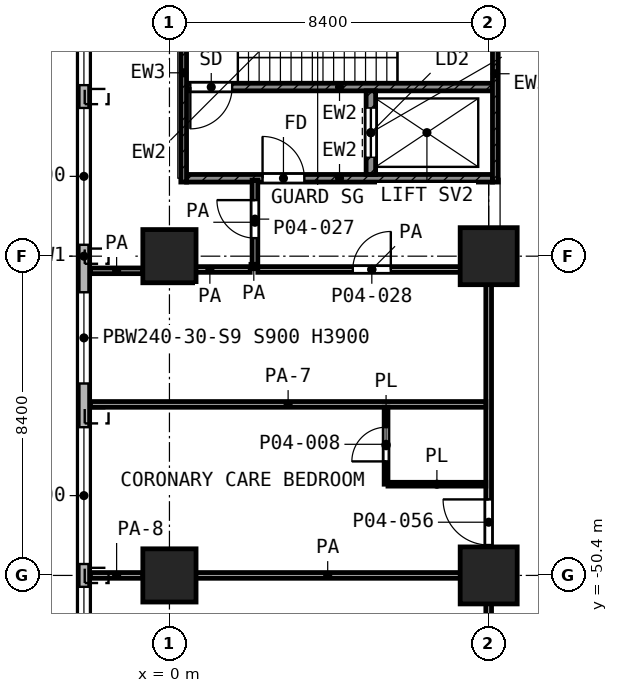
"""IFC4 building model, lengths in metres.
Left out: names, types, materials, properties, quantities, classifications, styles, units other than length and angle.
Written with IfcOpenShell. Run it as: python <this file> out.ifc"""

import sys

from ifc_helpers import new_model, si_unit, direction, frame, frame_2d, origin, origin_2d, place, context, subcontext, project, spatial, rectangle, extrude, element, fill, save


model = new_model("IFC4")
c1 = context("Model", 3, precision=1e-05, world=origin(), true_north=direction((0.0, 1.0)))
c2 = subcontext(c1, "Body", "Model", "MODEL_VIEW")
j1 = project(units=[si_unit("LENGTHUNIT", "METRE"), si_unit("PLANEANGLEUNIT", "RADIAN")], contexts=[c1])
p1 = place(None, origin())
s1 = spatial("IfcSite", under=j1, at=p1, CompositionType="ELEMENT")
p2 = place(p1, origin())
s2 = spatial("IfcBuilding", under=s1, at=p2, CompositionType="ELEMENT")
p3 = place(p2, frame((0.0, 0.0, 18.2)))
s3 = spatial("IfcBuildingStorey", under=s2, at=p3, CompositionType="ELEMENT", Elevation=18.2)
p4 = place(p3, frame((0.0, -42.0, 0.0), z_axis=(0.0, 0.0, 1.0), x_axis=(1.0, 0.0, 0.0)))
e1 = element("IfcColumn", 1, at=p4, inside=s3, PredefinedType="COLUMN", context=c2, shape_type="SweptSolid", body=[
    extrude(rectangle(XDim=1.4, YDim=1.4, at=origin_2d()), origin(), (0.0, 0.0, 1.0), 5.6),
])
p5 = place(p3, frame((8.4, -42.0, 0.0), z_axis=(0.0, 0.0, 1.0), x_axis=(1.0, 0.0, 0.0)))
e2 = element("IfcColumn", 2, at=p5, inside=s3, PredefinedType="COLUMN", context=c2, shape_type="SweptSolid", body=[
    extrude(rectangle(XDim=1.5, YDim=1.5, at=origin_2d()), origin(), (0.0, 0.0, 1.0), 5.6),
])
p6 = place(p3, frame((0.0, -50.4, 0.0), z_axis=(0.0, 0.0, 1.0), x_axis=(1.0, 0.0, 0.0)))
e3 = element("IfcColumn", 3, at=p6, inside=s3, PredefinedType="COLUMN", context=c2, shape_type="SweptSolid", body=[
    extrude(rectangle(XDim=1.4, YDim=1.4, at=origin_2d()), origin(), (0.0, 0.0, 1.0), 5.6),
])
p7 = place(p3, frame((8.4, -50.4, 0.0), z_axis=(0.0, 0.0, 1.0), x_axis=(1.0, 0.0, 0.0)))
e4 = element("IfcColumn", 4, at=p7, inside=s3, PredefinedType="COLUMN", context=c2, shape_type="SweptSolid", body=[
    extrude(rectangle(XDim=1.5, YDim=1.5, at=origin_2d()), origin(), (0.0, 0.0, 1.0), 5.6),
])
p8 = place(p3, frame((-2.25, -3.662, 0.0), z_axis=(0.0, 0.0, 1.0), x_axis=(0.0, -1.0, 0.0)))
e5 = element("IfcWall", 5, at=p8, inside=s3, PredefinedType="SOLIDWALL", context=c2, shape_type="SweptSolid", body=[
    extrude(rectangle(XDim=76.676, YDim=0.3, at=frame_2d((38.338, 0.0))), origin(), (0.0, 0.0, 1.0), 5.05),
])
p9 = place(p8, frame((0.838, 0.0, 0.9)))
e6 = element("IfcOpeningElement", 6, at=p9, cuts=e5, PredefinedType="OPENING", context=c2, shape_type="SweptSolid", body=[
    extrude(rectangle(XDim=3.6, YDim=3.0, at=frame_2d((1.8, 1.5))), frame((0.0, 0.16, 0.0), z_axis=(0.0, -1.0, 0.0), x_axis=(1.0, 0.0, 0.0)), (0.0, 0.0, 1.0), 0.32),
])
p10 = place(p8, frame((5.038, 0.0, 0.9)))
e7 = element("IfcOpeningElement", 7, at=p10, cuts=e5, PredefinedType="OPENING", context=c2, shape_type="SweptSolid", body=[
    extrude(rectangle(XDim=3.6, YDim=3.0, at=frame_2d((1.8, 1.5))), frame((0.0, 0.16, 0.0), z_axis=(0.0, -1.0, 0.0), x_axis=(1.0, 0.0, 0.0)), (0.0, 0.0, 1.0), 0.32),
])
p11 = place(p8, frame((9.238, 0.0, 0.9)))
e8 = element("IfcOpeningElement", 8, at=p11, cuts=e5, PredefinedType="OPENING", context=c2, shape_type="SweptSolid", body=[
    extrude(rectangle(XDim=3.6, YDim=3.0, at=frame_2d((1.8, 1.5))), frame((0.0, 0.16, 0.0), z_axis=(0.0, -1.0, 0.0), x_axis=(1.0, 0.0, 0.0)), (0.0, 0.0, 1.0), 0.32),
])
p12 = place(p8, frame((13.438, 0.0, 0.9)))
e9 = element("IfcOpeningElement", 9, at=p12, cuts=e5, PredefinedType="OPENING", context=c2, shape_type="SweptSolid", body=[
    extrude(rectangle(XDim=3.6, YDim=3.0, at=frame_2d((1.8, 1.5))), frame((0.0, 0.16, 0.0), z_axis=(0.0, -1.0, 0.0), x_axis=(1.0, 0.0, 0.0)), (0.0, 0.0, 1.0), 0.32),
])
p13 = place(p8, frame((17.638, 0.0, 0.9)))
e10 = element("IfcOpeningElement", 10, at=p13, cuts=e5, PredefinedType="OPENING", context=c2, shape_type="SweptSolid", body=[
    extrude(rectangle(XDim=3.6, YDim=3.0, at=frame_2d((1.8, 1.5))), frame((0.0, 0.16, 0.0), z_axis=(0.0, -1.0, 0.0), x_axis=(1.0, 0.0, 0.0)), (0.0, 0.0, 1.0), 0.32),
])
p14 = place(p8, frame((21.838, 0.0, 0.9)))
e11 = element("IfcOpeningElement", 11, at=p14, cuts=e5, PredefinedType="OPENING", context=c2, shape_type="SweptSolid", body=[
    extrude(rectangle(XDim=3.6, YDim=3.0, at=frame_2d((1.8, 1.5))), frame((0.0, 0.16, 0.0), z_axis=(0.0, -1.0, 0.0), x_axis=(1.0, 0.0, 0.0)), (0.0, 0.0, 1.0), 0.32),
])
p15 = place(p8, frame((26.038, 0.0, 0.9)))
e12 = element("IfcOpeningElement", 12, at=p15, cuts=e5, PredefinedType="OPENING", context=c2, shape_type="SweptSolid", body=[
    extrude(rectangle(XDim=3.6, YDim=3.0, at=frame_2d((1.8, 1.5))), frame((0.0, 0.16, 0.0), z_axis=(0.0, -1.0, 0.0), x_axis=(1.0, 0.0, 0.0)), (0.0, 0.0, 1.0), 0.32),
])
p16 = place(p8, frame((30.238, 0.0, 0.9)))
e13 = element("IfcOpeningElement", 13, at=p16, cuts=e5, PredefinedType="OPENING", context=c2, shape_type="SweptSolid", body=[
    extrude(rectangle(XDim=3.6, YDim=3.0, at=frame_2d((1.8, 1.5))), frame((0.0, 0.16, 0.0), z_axis=(0.0, -1.0, 0.0), x_axis=(1.0, 0.0, 0.0)), (0.0, 0.0, 1.0), 0.32),
])
p17 = place(p8, frame((34.438, 0.0, 0.9)))
e14 = element("IfcOpeningElement", 14, at=p17, cuts=e5, PredefinedType="OPENING", context=c2, shape_type="SweptSolid", body=[
    extrude(rectangle(XDim=3.6, YDim=3.0, at=frame_2d((1.8, 1.5))), frame((0.0, 0.16, 0.0), z_axis=(0.0, -1.0, 0.0), x_axis=(1.0, 0.0, 0.0)), (0.0, 0.0, 1.0), 0.32),
])
p18 = place(p8, frame((39.288, 0.0, 0.9)))
e15 = element("IfcOpeningElement", 15, at=p18, cuts=e5, PredefinedType="OPENING", context=c2, shape_type="SweptSolid", body=[
    extrude(rectangle(XDim=2.4, YDim=3.0, at=frame_2d((1.2, 1.5))), frame((0.0, 0.16, 0.0), z_axis=(0.0, -1.0, 0.0), x_axis=(1.0, 0.0, 0.0)), (0.0, 0.0, 1.0), 0.32),
])
p19 = place(p8, frame((42.838, 0.0, 0.9)))
e16 = element("IfcOpeningElement", 16, at=p19, cuts=e5, PredefinedType="OPENING", context=c2, shape_type="SweptSolid", body=[
    extrude(rectangle(XDim=3.6, YDim=3.0, at=frame_2d((1.8, 1.5))), frame((0.0, 0.16, 0.0), z_axis=(0.0, -1.0, 0.0), x_axis=(1.0, 0.0, 0.0)), (0.0, 0.0, 1.0), 0.32),
])
p20 = place(p8, frame((47.038, 0.0, 0.9)))
e17 = element("IfcOpeningElement", 17, at=p20, cuts=e5, PredefinedType="OPENING", context=c2, shape_type="SweptSolid", body=[
    extrude(rectangle(XDim=3.6, YDim=3.0, at=frame_2d((1.8, 1.5))), frame((0.0, 0.16, 0.0), z_axis=(0.0, -1.0, 0.0), x_axis=(1.0, 0.0, 0.0)), (0.0, 0.0, 1.0), 0.32),
])
p21 = place(p8, frame((51.238, 0.0, 0.9)))
e18 = element("IfcOpeningElement", 18, at=p21, cuts=e5, PredefinedType="OPENING", context=c2, shape_type="SweptSolid", body=[
    extrude(rectangle(XDim=3.6, YDim=3.0, at=frame_2d((1.8, 1.5))), frame((0.0, 0.16, 0.0), z_axis=(0.0, -1.0, 0.0), x_axis=(1.0, 0.0, 0.0)), (0.0, 0.0, 1.0), 0.32),
])
p22 = place(p8, frame((55.803, 0.0, 0.9)))
e19 = element("IfcOpeningElement", 19, at=p22, cuts=e5, PredefinedType="OPENING", context=c2, shape_type="SweptSolid", body=[
    extrude(rectangle(XDim=2.4, YDim=3.0, at=frame_2d((1.2, 1.5))), frame((0.0, 0.16, 0.0), z_axis=(0.0, -1.0, 0.0), x_axis=(1.0, 0.0, 0.0)), (0.0, 0.0, 1.0), 0.32),
])
p23 = place(p8, frame((59.638, 0.0, 0.9)))
e20 = element("IfcOpeningElement", 20, at=p23, cuts=e5, PredefinedType="OPENING", context=c2, shape_type="SweptSolid", body=[
    extrude(rectangle(XDim=3.6, YDim=3.0, at=frame_2d((1.8, 1.5))), frame((0.0, 0.16, 0.0), z_axis=(0.0, -1.0, 0.0), x_axis=(1.0, 0.0, 0.0)), (0.0, 0.0, 1.0), 0.32),
])
p24 = place(p8, frame((63.838, 0.0, 0.9)))
e21 = element("IfcOpeningElement", 21, at=p24, cuts=e5, PredefinedType="OPENING", context=c2, shape_type="SweptSolid", body=[
    extrude(rectangle(XDim=3.6, YDim=3.0, at=frame_2d((1.8, 1.5))), frame((0.0, 0.16, 0.0), z_axis=(0.0, -1.0, 0.0), x_axis=(1.0, 0.0, 0.0)), (0.0, 0.0, 1.0), 0.32),
])
p25 = place(p8, frame((68.438, 0.0, 0.9)))
e22 = element("IfcOpeningElement", 22, at=p25, cuts=e5, PredefinedType="OPENING", context=c2, shape_type="SweptSolid", body=[
    extrude(rectangle(XDim=1.2, YDim=3.0, at=frame_2d((0.6, 1.5))), frame((0.0, 0.16, 0.0), z_axis=(0.0, -1.0, 0.0), x_axis=(1.0, 0.0, 0.0)), (0.0, 0.0, 1.0), 0.32),
])
p26 = place(p8, frame((72.238, 0.0, 0.9)))
e23 = element("IfcOpeningElement", 23, at=p26, cuts=e5, PredefinedType="OPENING", context=c2, shape_type="SweptSolid", body=[
    extrude(rectangle(XDim=3.6, YDim=3.0, at=frame_2d((1.8, 1.5))), frame((0.0, 0.16, 0.0), z_axis=(0.0, -1.0, 0.0), x_axis=(1.0, 0.0, 0.0)), (0.0, 0.0, 1.0), 0.32),
])
p27 = place(p3, frame((0.375, -40.05, 0.0), z_axis=(0.0, 0.0, 1.0), x_axis=(0.0, 1.0, 0.0)))
e24 = element("IfcWall", 24, at=p27, inside=s3, PredefinedType="SHEAR", context=c2, shape_type="SweptSolid", body=[
    extrude(rectangle(XDim=5.75, YDim=0.15, at=frame_2d((2.875, 0.0))), origin(), (0.0, 0.0, 1.0), 5.05),
])
p28 = place(p3, frame((8.575, -40.05, 0.0), z_axis=(0.0, 0.0, 1.0), x_axis=(0.0, 1.0, 0.0)))
e25 = element("IfcWall", 25, at=p28, inside=s3, PredefinedType="SHEAR", context=c2, shape_type="SweptSolid", body=[
    extrude(rectangle(XDim=5.7, YDim=0.15, at=frame_2d((2.85, 0.0))), origin(), (0.0, 0.0, 1.0), 5.05),
])
p29 = place(p3, frame((0.45, -37.55, 0.0), z_axis=(0.0, 0.0, 1.0), x_axis=(1.0, 0.0, 0.0)))
e26 = element("IfcWall", 26, at=p29, inside=s3, PredefinedType="SHEAR", context=c2, shape_type="SweptSolid", body=[
    extrude(rectangle(XDim=8.05, YDim=0.2, at=frame_2d((4.025, 0.0))), origin(), (0.0, 0.0, 1.0), 5.05),
])
p30 = place(p29, frame((0.1, 0.0, 0.0)))
e27 = element("IfcOpeningElement", 27, at=p30, cuts=e26, PredefinedType="OPENING", context=c2, shape_type="SweptSolid", body=[
    extrude(rectangle(XDim=1.1, YDim=2.1, at=frame_2d((0.55, 1.05))), frame((0.0, 0.11, 0.0), z_axis=(0.0, -1.0, 0.0), x_axis=(1.0, 0.0, 0.0)), (0.0, 0.0, 1.0), 0.22),
])
p31 = place(p3, frame((0.45, -39.95, 0.0), z_axis=(0.0, 0.0, 1.0), x_axis=(1.0, 0.0, 0.0)))
e28 = element("IfcWall", 28, at=p31, inside=s3, PredefinedType="SHEAR", context=c2, shape_type="SweptSolid", body=[
    extrude(rectangle(XDim=8.05, YDim=0.2, at=frame_2d((4.025, 0.0))), origin(), (0.0, 0.0, 1.0), 5.05),
])
p32 = place(p31, frame((2.0, 0.0, 0.0)))
e29 = element("IfcOpeningElement", 29, at=p32, cuts=e28, PredefinedType="OPENING", context=c2, shape_type="SweptSolid", body=[
    extrude(rectangle(XDim=1.1, YDim=2.1, at=frame_2d((0.55, 1.05))), frame((0.0, 0.11, 0.0), z_axis=(0.0, -1.0, 0.0), x_axis=(1.0, 0.0, 0.0)), (0.0, 0.0, 1.0), 0.22),
])
p33 = place(p3, frame((5.3, -39.85, 0.0), z_axis=(0.0, 0.0, 1.0), x_axis=(0.0, 1.0, 0.0)))
e30 = element("IfcWall", 30, at=p33, inside=s3, PredefinedType="SHEAR", context=c2, shape_type="SweptSolid", body=[
    extrude(rectangle(XDim=2.2, YDim=0.25, at=frame_2d((1.1, 0.0))), origin(), (0.0, 0.0, 1.0), 5.05),
])
p34 = place(p33, frame((0.45, 0.0, 0.0)))
e31 = element("IfcOpeningElement", 31, at=p34, cuts=e30, PredefinedType="OPENING", context=c2, shape_type="SweptSolid", body=[
    extrude(rectangle(XDim=1.3, YDim=2.1, at=frame_2d((0.65, 1.05))), frame((0.0, 0.135, 0.0), z_axis=(0.0, -1.0, 0.0), x_axis=(1.0, 0.0, 0.0)), (0.0, 0.0, 1.0), 0.27),
])
p35 = place(p3, frame((5.75, -48.0, 0.0), z_axis=(0.0, 0.0, 1.0), x_axis=(1.0, 0.0, 0.0)))
e32 = element("IfcWall", 32, at=p35, inside=s3, PredefinedType="PARTITIONING", context=c2, shape_type="SweptSolid", body=[
    extrude(rectangle(XDim=2.575, YDim=0.1, at=frame_2d((1.288, 0.0))), origin(), (0.0, 0.0, 1.0), 5.05),
])
p36 = place(p3, frame((5.7, -48.0, 0.0), z_axis=(0.0, 0.0, 1.0), x_axis=(0.0, 1.0, 0.0)))
e33 = element("IfcWall", 33, at=p36, inside=s3, PredefinedType="PARTITIONING", context=c2, shape_type="SweptSolid", body=[
    extrude(rectangle(XDim=2.025, YDim=0.1, at=frame_2d((1.012, 0.0))), origin(), (0.0, 0.0, 1.0), 5.05),
])
p37 = place(p36, frame((0.6, 0.0, 0.0)))
e34 = element("IfcOpeningElement", 34, at=p37, cuts=e33, PredefinedType="OPENING", context=c2, shape_type="SweptSolid", body=[
    extrude(rectangle(XDim=0.9, YDim=2.1, at=frame_2d((0.45, 1.05))), frame((0.0, 0.06, 0.0), z_axis=(0.0, -1.0, 0.0), x_axis=(1.0, 0.0, 0.0)), (0.0, 0.0, 1.0), 0.12),
])
p38 = place(p3, frame((-2.08, -50.4, 0.0), z_axis=(0.0, 0.0, 1.0), x_axis=(1.0, 0.0, 0.0)))
e35 = element("IfcWall", 35, at=p38, inside=s3, PredefinedType="PARTITIONING", context=c2, shape_type="SweptSolid", body=[
    extrude(rectangle(XDim=1.38, YDim=0.15, at=frame_2d((0.69, 0.0))), origin(), (0.0, 0.0, 1.0), 4.15),
])
p39 = place(p3, frame((0.003, -50.4, 0.0), z_axis=(0.0, 0.0, 1.0), x_axis=(1.0, 0.0, 0.0)))
e36 = element("IfcWall", 36, at=p39, inside=s3, PredefinedType="PARTITIONING", context=c2, shape_type="SweptSolid", body=[
    extrude(rectangle(XDim=8.322, YDim=0.15, at=frame_2d((4.161, 0.0))), origin(), (0.0, 0.0, 1.0), 5.05),
])
p40 = place(p3, frame((-2.08, -45.9, 0.0), z_axis=(0.0, 0.0, 1.0), x_axis=(1.0, 0.0, 0.0)))
e37 = element("IfcWall", 37, at=p40, inside=s3, PredefinedType="PARTITIONING", context=c2, shape_type="SweptSolid", body=[
    extrude(rectangle(XDim=10.405, YDim=0.15, at=frame_2d((5.203, 0.0))), origin(), (0.0, 0.0, 1.0), 3.65),
])
p41 = place(p3, frame((-2.08, -42.385, 0.0), z_axis=(0.0, 0.0, 1.0), x_axis=(1.0, 0.0, 0.0)))
e38 = element("IfcWall", 38, at=p41, inside=s3, PredefinedType="PARTITIONING", context=c2, shape_type="SweptSolid", body=[
    extrude(rectangle(XDim=1.38, YDim=0.15, at=frame_2d((0.69, 0.0))), origin(), (0.0, 0.0, 1.0), 5.05),
])
p42 = place(p3, frame((0.003, -42.35, 0.0), z_axis=(0.0, 0.0, 1.0), x_axis=(1.0, 0.0, 0.0)))
e39 = element("IfcWall", 39, at=p42, inside=s3, PredefinedType="PARTITIONING", context=c2, shape_type="SweptSolid", body=[
    extrude(rectangle(XDim=2.122, YDim=0.15, at=frame_2d((1.061, 0.0))), origin(), (0.0, 0.0, 1.0), 5.05),
])
p43 = place(p3, frame((2.325, -42.35, 0.0), z_axis=(0.0, 0.0, 1.0), x_axis=(1.0, 0.0, 0.0)))
e40 = element("IfcWall", 40, at=p43, inside=s3, PredefinedType="PARTITIONING", context=c2, shape_type="SweptSolid", body=[
    extrude(rectangle(XDim=6.0, YDim=0.15, at=frame_2d((3.0, 0.0))), origin(), (0.0, 0.0, 1.0), 5.05),
])
p44 = place(p43, frame((2.5, 0.0, 0.0)))
e41 = element("IfcOpeningElement", 41, at=p44, cuts=e40, PredefinedType="OPENING", context=c2, shape_type="SweptSolid", body=[
    extrude(rectangle(XDim=1.0, YDim=2.1, at=frame_2d((0.5, 1.05))), frame((0.0, 0.085, 0.0), z_axis=(0.0, -1.0, 0.0), x_axis=(1.0, 0.0, 0.0)), (0.0, 0.0, 1.0), 0.17),
])
p45 = place(p3, frame((2.22, -42.33, 0.0), z_axis=(0.0, 0.0, 1.0), x_axis=(0.0, 1.0, 0.0)))
e42 = element("IfcWall", 42, at=p45, inside=s3, PredefinedType="PARTITIONING", context=c2, shape_type="SweptSolid", body=[
    extrude(rectangle(XDim=0.115, YDim=0.15, at=frame_2d((0.058, 0.0))), origin(), (0.0, 0.0, 1.0), 5.05),
])
p46 = place(p3, frame((2.25, -42.215, 0.0), z_axis=(0.0, 0.0, 1.0), x_axis=(0.0, 1.0, 0.0)))
e43 = element("IfcWall", 43, at=p46, inside=s3, PredefinedType="PARTITIONING", context=c2, shape_type="SweptSolid", body=[
    extrude(rectangle(XDim=2.215, YDim=0.15, at=frame_2d((1.107, 0.0))), origin(), (0.0, 0.0, 1.0), 5.05),
])
p47 = place(p46, frame((0.69, 0.0, 0.0)))
e44 = element("IfcOpeningElement", 44, at=p47, cuts=e43, PredefinedType="OPENING", context=c2, shape_type="SweptSolid", body=[
    extrude(rectangle(XDim=1.0, YDim=2.1, at=frame_2d((0.5, 1.05))), frame((0.0, 0.085, 0.0), z_axis=(0.0, -1.0, 0.0), x_axis=(1.0, 0.0, 0.0)), (0.0, 0.0, 1.0), 0.17),
])
p48 = place(p3, frame((8.4, -67.947, 0.0), z_axis=(0.0, 0.0, 1.0), x_axis=(0.0, 1.0, 0.0)))
e45 = element("IfcWall", 45, at=p48, inside=s3, PredefinedType="PARTITIONING", context=c2, shape_type="SweptSolid", body=[
    extrude(rectangle(XDim=25.597, YDim=0.15, at=frame_2d((12.798, 0.0))), origin(), (0.0, 0.0, 1.0), 5.05),
])
p49 = place(p48, frame((18.347, 0.0, 0.0)))
e46 = element("IfcOpeningElement", 46, at=p49, cuts=e45, PredefinedType="OPENING", context=c2, shape_type="SweptSolid", body=[
    extrude(rectangle(XDim=1.2, YDim=2.1, at=frame_2d((0.6, 1.05))), frame((0.0, 0.085, 0.0), z_axis=(0.0, -1.0, 0.0), x_axis=(1.0, 0.0, 0.0)), (0.0, 0.0, 1.0), 0.17),
])
p50 = place(p48, frame((7.147, 0.0, 0.0)))
e47 = element("IfcOpeningElement", 47, at=p50, cuts=e45, PredefinedType="OPENING", context=c2, shape_type="SweptSolid", body=[
    extrude(rectangle(XDim=1.2, YDim=2.1, at=frame_2d((0.6, 1.05))), frame((0.0, 0.085, 0.0), z_axis=(0.0, -1.0, 0.0), x_axis=(1.0, 0.0, 0.0)), (0.0, 0.0, 1.0), 0.17),
])
p51 = place(p48, frame((9.947, 0.0, 0.0)))
e48 = element("IfcOpeningElement", 48, at=p51, cuts=e45, PredefinedType="OPENING", context=c2, shape_type="SweptSolid", body=[
    extrude(rectangle(XDim=1.2, YDim=2.1, at=frame_2d((0.6, 1.05))), frame((0.0, 0.085, 0.0), z_axis=(0.0, -1.0, 0.0), x_axis=(1.0, 0.0, 0.0)), (0.0, 0.0, 1.0), 0.17),
])
p52 = place(p48, frame((1.549, 0.0, 0.0)))
e49 = element("IfcOpeningElement", 49, at=p52, cuts=e45, PredefinedType="OPENING", context=c2, shape_type="SweptSolid", body=[
    extrude(rectangle(XDim=1.2, YDim=2.1, at=frame_2d((0.6, 1.05))), frame((0.0, 0.085, 0.0), z_axis=(0.0, -1.0, 0.0), x_axis=(1.0, 0.0, 0.0)), (0.0, 0.0, 1.0), 0.17),
])
p53 = place(p16, origin())
e50 = element("IfcWindow", 50, at=p53, inside=s3, PartitioningType="SINGLE_PANEL", PredefinedType="WINDOW", context=c2, shape_type="SweptSolid", body=[
    extrude(rectangle(XDim=3.6, YDim=3.0, at=frame_2d((1.8, 1.5))), frame((0.0, 0.03, 0.0), z_axis=(0.0, -1.0, 0.0), x_axis=(1.0, 0.0, 0.0)), (0.0, 0.0, 1.0), 0.06),
])
fill(e13, e50)
p54 = place(p17, origin())
e51 = element("IfcWindow", 51, at=p54, inside=s3, PartitioningType="SINGLE_PANEL", PredefinedType="WINDOW", context=c2, shape_type="SweptSolid", body=[
    extrude(rectangle(XDim=3.6, YDim=3.0, at=frame_2d((1.8, 1.5))), frame((0.0, 0.03, 0.0), z_axis=(0.0, -1.0, 0.0), x_axis=(1.0, 0.0, 0.0)), (0.0, 0.0, 1.0), 0.06),
])
fill(e14, e51)
p55 = place(p18, origin())
e52 = element("IfcWindow", 52, at=p55, inside=s3, PartitioningType="SINGLE_PANEL", PredefinedType="WINDOW", context=c2, shape_type="SweptSolid", body=[
    extrude(rectangle(XDim=2.4, YDim=3.0, at=frame_2d((1.2, 1.5))), frame((0.0, 0.03, 0.0), z_axis=(0.0, -1.0, 0.0), x_axis=(1.0, 0.0, 0.0)), (0.0, 0.0, 1.0), 0.06),
])
fill(e15, e52)
p56 = place(p19, origin())
e53 = element("IfcWindow", 53, at=p56, inside=s3, PartitioningType="SINGLE_PANEL", PredefinedType="WINDOW", context=c2, shape_type="SweptSolid", body=[
    extrude(rectangle(XDim=3.6, YDim=3.0, at=frame_2d((1.8, 1.5))), frame((0.0, 0.03, 0.0), z_axis=(0.0, -1.0, 0.0), x_axis=(1.0, 0.0, 0.0)), (0.0, 0.0, 1.0), 0.06),
])
fill(e16, e53)
p57 = place(p20, origin())
e54 = element("IfcWindow", 54, at=p57, inside=s3, PartitioningType="SINGLE_PANEL", PredefinedType="WINDOW", context=c2, shape_type="SweptSolid", body=[
    extrude(rectangle(XDim=3.6, YDim=3.0, at=frame_2d((1.8, 1.5))), frame((0.0, 0.03, 0.0), z_axis=(0.0, -1.0, 0.0), x_axis=(1.0, 0.0, 0.0)), (0.0, 0.0, 1.0), 0.06),
])
fill(e17, e54)
p58 = place(p30, frame((1.1, 0.0, 0.0), z_axis=(0.0, 0.0, 1.0), x_axis=(-1.0, 0.0, 0.0)))
e55 = element("IfcDoor", 55, at=p58, inside=s3, OperationType="SINGLE_SWING_LEFT", PredefinedType="DOOR", context=c2, shape_type="SweptSolid", body=[
    extrude(rectangle(XDim=1.1, YDim=2.1, at=frame_2d((0.55, 1.05))), frame((0.0, 0.025, 0.0), z_axis=(0.0, -1.0, 0.0), x_axis=(1.0, 0.0, 0.0)), (0.0, 0.0, 1.0), 0.05),
])
fill(e27, e55)
p59 = place(p34, origin())
e56 = element("IfcDoor", 56, at=p59, inside=s3, OperationType="DOUBLE_DOOR_SLIDING", PredefinedType="DOOR", context=c2, shape_type="SweptSolid", body=[
    extrude(rectangle(XDim=1.3, YDim=2.1, at=frame_2d((0.65, 1.05))), frame((0.0, 0.025, 0.0), z_axis=(0.0, -1.0, 0.0), x_axis=(1.0, 0.0, 0.0)), (0.0, 0.0, 1.0), 0.05),
])
fill(e31, e56)
p60 = place(p32, origin())
e57 = element("IfcDoor", 57, at=p60, inside=s3, OperationType="SINGLE_SWING_LEFT", PredefinedType="DOOR", context=c2, shape_type="SweptSolid", body=[
    extrude(rectangle(XDim=1.1, YDim=2.1, at=frame_2d((0.55, 1.05))), frame((0.0, 0.025, 0.0), z_axis=(0.0, -1.0, 0.0), x_axis=(1.0, 0.0, 0.0)), (0.0, 0.0, 1.0), 0.05),
])
fill(e29, e57)
p61 = place(p47, origin())
e58 = element("IfcDoor", 58, at=p61, inside=s3, OperationType="SINGLE_SWING_RIGHT", PredefinedType="DOOR", context=c2, shape_type="SweptSolid", body=[
    extrude(rectangle(XDim=1.0, YDim=2.1, at=frame_2d((0.5, 1.05))), frame((0.0, 0.025, 0.0), z_axis=(0.0, -1.0, 0.0), x_axis=(1.0, 0.0, 0.0)), (0.0, 0.0, 1.0), 0.05),
])
fill(e44, e58)
p62 = place(p44, origin())
e59 = element("IfcDoor", 59, at=p62, inside=s3, OperationType="SINGLE_SWING_RIGHT", PredefinedType="DOOR", context=c2, shape_type="SweptSolid", body=[
    extrude(rectangle(XDim=1.0, YDim=2.1, at=frame_2d((0.5, 1.05))), frame((0.0, 0.025, 0.0), z_axis=(0.0, -1.0, 0.0), x_axis=(1.0, 0.0, 0.0)), (0.0, 0.0, 1.0), 0.05),
])
fill(e41, e59)
p63 = place(p49, origin())
e60 = element("IfcDoor", 60, at=p63, inside=s3, OperationType="SINGLE_SWING_RIGHT", PredefinedType="DOOR", context=c2, shape_type="SweptSolid", body=[
    extrude(rectangle(XDim=1.2, YDim=2.1, at=frame_2d((0.6, 1.05))), frame((0.0, 0.025, 0.0), z_axis=(0.0, -1.0, 0.0), x_axis=(1.0, 0.0, 0.0)), (0.0, 0.0, 1.0), 0.05),
])
fill(e46, e60)
p64 = place(p37, origin())
e61 = element("IfcDoor", 61, at=p64, inside=s3, OperationType="SINGLE_SWING_LEFT", PredefinedType="DOOR", context=c2, shape_type="SweptSolid", body=[
    extrude(rectangle(XDim=0.9, YDim=2.1, at=frame_2d((0.45, 1.05))), frame((0.0, 0.025, 0.0), z_axis=(0.0, -1.0, 0.0), x_axis=(1.0, 0.0, 0.0)), (0.0, 0.0, 1.0), 0.05),
])
fill(e34, e61)
save(model, sys.argv[1])
